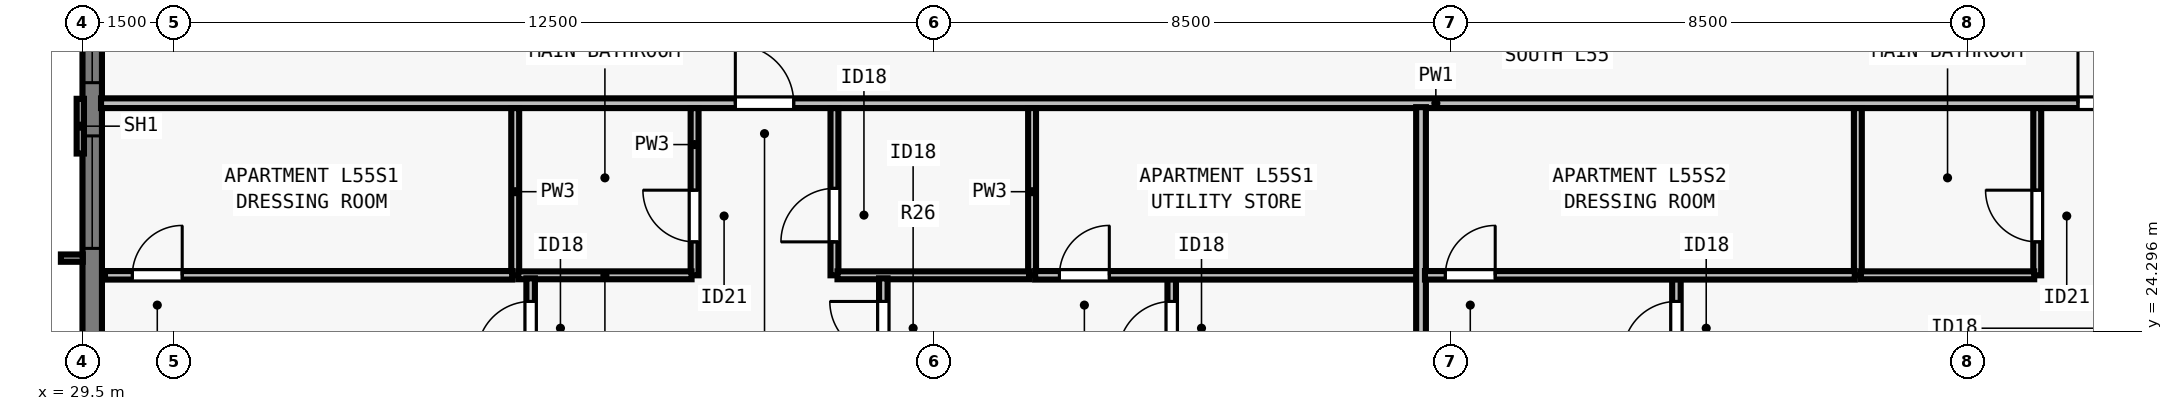
"""IFC4 building model, lengths in metres.
Left out: names, types, materials, properties, quantities, classifications, styles, units other than length and angle.
Written with IfcOpenShell. Run it as: python <this file> out.ifc"""

import sys

from ifc_helpers import new_model, si_unit, direction, frame, frame_2d, origin, place, context, subcontext, project, spatial, rectangle, extrude, element, fill, save


model = new_model("IFC4")
c1 = context("Model", 3, precision=1e-05, world=origin(), true_north=direction((0.0, 1.0)))
c2 = subcontext(c1, "Body", "Model", "MODEL_VIEW")
j1 = project(units=[si_unit("LENGTHUNIT", "METRE"), si_unit("PLANEANGLEUNIT", "RADIAN")], contexts=[c1])
p1 = place(None, origin())
s1 = spatial("IfcSite", under=j1, at=p1, CompositionType="ELEMENT")
p2 = place(p1, origin())
s2 = spatial("IfcBuilding", under=s1, at=p2, CompositionType="ELEMENT")
p3 = place(p2, frame((0.0, 0.0, 202.5)))
s3 = spatial("IfcBuildingStorey", under=s2, at=p3, CompositionType="ELEMENT", Elevation=202.5)
p4 = place(p3, frame((29.66, 21.5, 0.0), z_axis=(0.0, 0.0, 1.0), x_axis=(0.0, 1.0, 0.0)))
e1 = element("IfcWall", 1, at=p4, inside=s3, PredefinedType="SOLIDWALL", context=c2, shape_type="SweptSolid", body=[
    extrude(rectangle(XDim=34.702, YDim=0.32, at=frame_2d((17.351, 0.0))), origin(), (0.0, 0.0, 1.0), 3.29),
])
p5 = place(p4, frame((4.163, 0.0, 0.8)))
e2 = element("IfcOpeningElement", 2, at=p5, cuts=e1, PredefinedType="OPENING", context=c2, shape_type="SweptSolid", body=[
    extrude(rectangle(XDim=1.85, YDim=1.678, at=frame_2d((0.925, 0.839))), frame((0.0, 0.17, 0.0), z_axis=(0.0, -1.0, 0.0), x_axis=(1.0, 0.0, 0.0)), (0.0, 0.0, 1.0), 0.34),
])
p6 = place(p4, frame((6.888, 0.0, 0.8)))
e3 = element("IfcOpeningElement", 3, at=p6, cuts=e1, PredefinedType="OPENING", context=c2, shape_type="SweptSolid", body=[
    extrude(rectangle(XDim=1.55, YDim=1.678, at=frame_2d((0.775, 0.839))), frame((0.0, 0.17, 0.0), z_axis=(0.0, -1.0, 0.0), x_axis=(1.0, 0.0, 0.0)), (0.0, 0.0, 1.0), 0.34),
])
p7 = place(p4, frame((10.113, 0.0, 0.8)))
e4 = element("IfcOpeningElement", 4, at=p7, cuts=e1, PredefinedType="OPENING", context=c2, shape_type="SweptSolid", body=[
    extrude(rectangle(XDim=1.85, YDim=1.678, at=frame_2d((0.925, 0.839))), frame((0.0, 0.17, 0.0), z_axis=(0.0, -1.0, 0.0), x_axis=(1.0, 0.0, 0.0)), (0.0, 0.0, 1.0), 0.34),
])
p8 = place(p4, frame((14.888, 0.0, 0.8)))
e5 = element("IfcOpeningElement", 5, at=p8, cuts=e1, PredefinedType="OPENING", context=c2, shape_type="SweptSolid", body=[
    extrude(rectangle(XDim=1.55, YDim=1.678, at=frame_2d((0.775, 0.839))), frame((0.0, 0.17, 0.0), z_axis=(0.0, -1.0, 0.0), x_axis=(1.0, 0.0, 0.0)), (0.0, 0.0, 1.0), 0.34),
])
p9 = place(p4, frame((19.364, 0.0, 0.8)))
e6 = element("IfcOpeningElement", 6, at=p9, cuts=e1, PredefinedType="OPENING", context=c2, shape_type="SweptSolid", body=[
    extrude(rectangle(XDim=1.85, YDim=1.678, at=frame_2d((0.925, 0.839))), frame((0.0, 0.17, 0.0), z_axis=(0.0, -1.0, 0.0), x_axis=(1.0, 0.0, 0.0)), (0.0, 0.0, 1.0), 0.34),
])
p10 = place(p4, frame((23.614, 0.0, 0.8)))
e7 = element("IfcOpeningElement", 7, at=p10, cuts=e1, PredefinedType="OPENING", context=c2, shape_type="SweptSolid", body=[
    extrude(rectangle(XDim=1.85, YDim=1.678, at=frame_2d((0.925, 0.839))), frame((0.0, 0.17, 0.0), z_axis=(0.0, -1.0, 0.0), x_axis=(1.0, 0.0, 0.0)), (0.0, 0.0, 1.0), 0.34),
])
p11 = place(p4, frame((28.839, 0.0, 0.8)))
e8 = element("IfcOpeningElement", 8, at=p11, cuts=e1, PredefinedType="OPENING", context=c2, shape_type="SweptSolid", body=[
    extrude(rectangle(XDim=1.55, YDim=1.678, at=frame_2d((0.775, 0.839))), frame((0.0, 0.17, 0.0), z_axis=(0.0, -1.0, 0.0), x_axis=(1.0, 0.0, 0.0)), (0.0, 0.0, 1.0), 0.34),
])
p12 = place(p3, frame((29.805, 28.05, 0.0), z_axis=(0.0, 0.0, 1.0), x_axis=(1.0, 0.0, 0.0)))
e9 = element("IfcWall", 9, at=p12, inside=s3, PredefinedType="PARTITIONING", context=c2, shape_type="SweptSolid", body=[
    extrude(rectangle(XDim=44.39, YDim=0.16, at=frame_2d((22.195, 0.0))), origin(), (0.0, 0.0, 1.0), 2.958),
])
p13 = place(p12, frame((10.431, 0.0, 0.0)))
e10 = element("IfcOpeningElement", 10, at=p13, cuts=e9, PredefinedType="OPENING", context=c2, shape_type="SweptSolid", body=[
    extrude(rectangle(XDim=0.96, YDim=2.18, at=frame_2d((0.48, 1.09))), frame((0.0, 0.09, 0.0), z_axis=(0.0, -1.0, 0.0), x_axis=(1.0, 0.0, 0.0)), (0.0, 0.0, 1.0), 0.18),
])
p14 = place(p12, frame((32.511, 0.0, 0.0)))
e11 = element("IfcOpeningElement", 11, at=p14, cuts=e9, PredefinedType="OPENING", context=c2, shape_type="SweptSolid", body=[
    extrude(rectangle(XDim=0.96, YDim=2.18, at=frame_2d((0.48, 1.09))), frame((0.0, 0.09, 0.0), z_axis=(0.0, -1.0, 0.0), x_axis=(1.0, 0.0, 0.0)), (0.0, 0.0, 1.0), 0.18),
])
p15 = place(p3, frame((36.616, 25.22, 0.0), z_axis=(0.0, 0.0, 1.0), x_axis=(0.0, 1.0, 0.0)))
e12 = element("IfcWall", 12, at=p15, inside=s3, PredefinedType="PLUMBINGWALL", context=c2, shape_type="SweptSolid", body=[
    extrude(rectangle(XDim=2.75, YDim=0.13, at=frame_2d((1.375, 0.0))), origin(), (0.0, 0.0, 1.0), 3.29),
])
p16 = place(p3, frame((39.566, 25.22, 0.0), z_axis=(0.0, 0.0, 1.0), x_axis=(0.0, 1.0, 0.0)))
e13 = element("IfcWall", 13, at=p16, inside=s3, PredefinedType="PLUMBINGWALL", context=c2, shape_type="SweptSolid", body=[
    extrude(rectangle(XDim=2.75, YDim=0.13, at=frame_2d((1.375, 0.0))), origin(), (0.0, 0.0, 1.0), 3.29),
])
p17 = place(p16, frame((0.55, 0.0, 0.0)))
e14 = element("IfcOpeningElement", 14, at=p17, cuts=e13, PredefinedType="OPENING", context=c2, shape_type="SweptSolid", body=[
    extrude(rectangle(XDim=0.85, YDim=2.08, at=frame_2d((0.425, 1.04))), frame((0.0, 0.075, 0.0), z_axis=(0.0, -1.0, 0.0), x_axis=(1.0, 0.0, 0.0)), (0.0, 0.0, 1.0), 0.15),
])
p18 = place(p3, frame((36.666, 25.22, 0.0), z_axis=(0.0, 0.0, 1.0), x_axis=(1.0, 0.0, 0.0)))
e15 = element("IfcWall", 15, at=p18, inside=s3, PredefinedType="PLUMBINGWALL", context=c2, shape_type="SweptSolid", body=[
    extrude(rectangle(XDim=2.85, YDim=0.13, at=frame_2d((1.425, 0.0))), origin(), (0.0, 0.0, 1.0), 3.29),
])
p19 = place(p3, frame((45.116, 25.22, 0.0), z_axis=(0.0, 0.0, 1.0), x_axis=(0.0, 1.0, 0.0)))
e16 = element("IfcWall", 16, at=p19, inside=s3, PredefinedType="PLUMBINGWALL", context=c2, shape_type="SweptSolid", body=[
    extrude(rectangle(XDim=2.75, YDim=0.13, at=frame_2d((1.375, 0.0))), origin(), (0.0, 0.0, 1.0), 3.29),
])
p20 = place(p3, frame((41.866, 25.22, 0.0), z_axis=(0.0, 0.0, 1.0), x_axis=(0.0, 1.0, 0.0)))
e17 = element("IfcWall", 17, at=p20, inside=s3, PredefinedType="PLUMBINGWALL", context=c2, shape_type="SweptSolid", body=[
    extrude(rectangle(XDim=2.75, YDim=0.13, at=frame_2d((1.375, 0.0))), origin(), (0.0, 0.0, 1.0), 2.573),
])
p21 = place(p20, frame((0.55, 0.0, 0.0)))
e18 = element("IfcOpeningElement", 18, at=p21, cuts=e17, PredefinedType="OPENING", context=c2, shape_type="SweptSolid", body=[
    extrude(rectangle(XDim=0.88, YDim=2.1, at=frame_2d((0.44, 1.05))), frame((0.0, 0.075, 0.0), z_axis=(0.0, -1.0, 0.0), x_axis=(1.0, 0.0, 0.0)), (0.0, 0.0, 1.0), 0.15),
])
p22 = place(p3, frame((41.916, 25.22, 0.0), z_axis=(0.0, 0.0, 1.0), x_axis=(1.0, 0.0, 0.0)))
e19 = element("IfcWall", 19, at=p22, inside=s3, PredefinedType="PLUMBINGWALL", context=c2, shape_type="SweptSolid", body=[
    extrude(rectangle(XDim=3.15, YDim=0.13, at=frame_2d((1.575, 0.0))), origin(), (0.0, 0.0, 1.0), 3.29),
])
p23 = place(p3, frame((36.87, 16.88, 0.0), z_axis=(0.0, 0.0, 1.0), x_axis=(0.0, 1.0, 0.0)))
e20 = element("IfcWall", 20, at=p23, inside=s3, PredefinedType="PARTITIONING", context=c2, shape_type="SweptSolid", body=[
    extrude(rectangle(XDim=8.29, YDim=0.14, at=frame_2d((4.145, 0.0))), origin(), (0.0, 0.0, 1.0), 2.573),
])
p24 = place(p23, frame((7.03, 0.0, 0.0)))
e21 = element("IfcOpeningElement", 21, at=p24, cuts=e20, PredefinedType="OPENING", context=c2, shape_type="SweptSolid", body=[
    extrude(rectangle(XDim=0.88, YDim=2.1, at=frame_2d((0.44, 1.05))), frame((0.0, 0.08, 0.0), z_axis=(0.0, -1.0, 0.0), x_axis=(1.0, 0.0, 0.0)), (0.0, 0.0, 1.0), 0.16),
])
p25 = place(p3, frame((29.87, 25.22, 0.0), z_axis=(0.0, 0.0, 1.0), x_axis=(1.0, 0.0, 0.0)))
e22 = element("IfcWall", 22, at=p25, inside=s3, PredefinedType="PARTITIONING", context=c2, shape_type="SweptSolid", body=[
    extrude(rectangle(XDim=6.696, YDim=0.14, at=frame_2d((3.348, 0.0))), origin(), (0.0, 0.0, 1.0), 2.958),
])
p26 = place(p25, frame((0.45, 0.0, 0.0)))
e23 = element("IfcOpeningElement", 23, at=p26, cuts=e22, PredefinedType="OPENING", context=c2, shape_type="SweptSolid", body=[
    extrude(rectangle(XDim=0.82, YDim=2.1, at=frame_2d((0.41, 1.05))), frame((0.0, 0.08, 0.0), z_axis=(0.0, -1.0, 0.0), x_axis=(1.0, 0.0, 0.0)), (0.0, 0.0, 1.0), 0.16),
])
p27 = place(p3, frame((47.413, 16.88, 0.0), z_axis=(0.0, 0.0, 1.0), x_axis=(0.0, 1.0, 0.0)))
e24 = element("IfcWall", 24, at=p27, inside=s3, PredefinedType="PARTITIONING", context=c2, shape_type="SweptSolid", body=[
    extrude(rectangle(XDim=8.38, YDim=0.14, at=frame_2d((4.19, 0.0))), origin(), (0.0, 0.0, 1.0), 2.573),
])
p28 = place(p27, frame((7.03, 0.0, 0.0)))
e25 = element("IfcOpeningElement", 25, at=p28, cuts=e24, PredefinedType="OPENING", context=c2, shape_type="SweptSolid", body=[
    extrude(rectangle(XDim=0.88, YDim=2.1, at=frame_2d((0.44, 1.05))), frame((0.0, 0.08, 0.0), z_axis=(0.0, -1.0, 0.0), x_axis=(1.0, 0.0, 0.0)), (0.0, 0.0, 1.0), 0.16),
])
p29 = place(p3, frame((45.166, 25.22, 0.0), z_axis=(0.0, 0.0, 1.0), x_axis=(1.0, 0.0, 0.0)))
e26 = element("IfcWall", 26, at=p29, inside=s3, PredefinedType="PARTITIONING", context=c2, shape_type="SweptSolid", body=[
    extrude(rectangle(XDim=6.396, YDim=0.14, at=frame_2d((3.198, 0.0))), origin(), (0.0, 0.0, 1.0), 3.29),
])
p30 = place(p29, frame((0.4, 0.0, 0.0)))
e27 = element("IfcOpeningElement", 27, at=p30, cuts=e26, PredefinedType="OPENING", context=c2, shape_type="SweptSolid", body=[
    extrude(rectangle(XDim=0.82, YDim=2.1, at=frame_2d((0.41, 1.05))), frame((0.0, 0.08, 0.0), z_axis=(0.0, -1.0, 0.0), x_axis=(1.0, 0.0, 0.0)), (0.0, 0.0, 1.0), 0.16),
])
p31 = place(p3, frame((42.67, 16.88, 0.0), z_axis=(0.0, 0.0, 1.0), x_axis=(0.0, 1.0, 0.0)))
e28 = element("IfcWall", 28, at=p31, inside=s3, PredefinedType="PARTITIONING", context=c2, shape_type="SweptSolid", body=[
    extrude(rectangle(XDim=8.29, YDim=0.14, at=frame_2d((4.145, 0.0))), origin(), (0.0, 0.0, 1.0), 3.29),
])
p32 = place(p31, frame((7.03, 0.0, 0.0)))
e29 = element("IfcOpeningElement", 29, at=p32, cuts=e28, PredefinedType="OPENING", context=c2, shape_type="SweptSolid", body=[
    extrude(rectangle(XDim=0.88, YDim=2.1, at=frame_2d((0.44, 1.05))), frame((0.0, 0.08, 0.0), z_axis=(0.0, -1.0, 0.0), x_axis=(1.0, 0.0, 0.0)), (0.0, 0.0, 1.0), 0.16),
])
p33 = place(p3, frame((51.512, 16.805, 0.0), z_axis=(0.0, 0.0, 1.0), x_axis=(0.0, 1.0, 0.0)))
e30 = element("IfcWall", 30, at=p33, inside=s3, PredefinedType="PARTITIONING", context=c2, shape_type="SweptSolid", body=[
    extrude(rectangle(XDim=11.18, YDim=0.16, at=frame_2d((5.59, 0.0))), origin(), (0.0, 0.0, 1.0), 2.958),
])
p34 = place(p3, frame((58.696, 25.22, 0.0), z_axis=(0.0, 0.0, 1.0), x_axis=(0.0, 1.0, 0.0)))
e31 = element("IfcWall", 31, at=p34, inside=s3, PredefinedType="PLUMBINGWALL", context=c2, shape_type="SweptSolid", body=[
    extrude(rectangle(XDim=2.75, YDim=0.13, at=frame_2d((1.375, 0.0))), origin(), (0.0, 0.0, 1.0), 3.29),
])
p35 = place(p3, frame((61.646, 25.22, 0.0), z_axis=(0.0, 0.0, 1.0), x_axis=(0.0, 1.0, 0.0)))
e32 = element("IfcWall", 32, at=p35, inside=s3, PredefinedType="PLUMBINGWALL", context=c2, shape_type="SweptSolid", body=[
    extrude(rectangle(XDim=2.75, YDim=0.13, at=frame_2d((1.375, 0.0))), origin(), (0.0, 0.0, 1.0), 3.29),
])
p36 = place(p35, frame((0.55, 0.0, 0.0)))
e33 = element("IfcOpeningElement", 33, at=p36, cuts=e32, PredefinedType="OPENING", context=c2, shape_type="SweptSolid", body=[
    extrude(rectangle(XDim=0.85, YDim=2.08, at=frame_2d((0.425, 1.04))), frame((0.0, 0.075, 0.0), z_axis=(0.0, -1.0, 0.0), x_axis=(1.0, 0.0, 0.0)), (0.0, 0.0, 1.0), 0.15),
])
p37 = place(p3, frame((58.746, 25.22, 0.0), z_axis=(0.0, 0.0, 1.0), x_axis=(1.0, 0.0, 0.0)))
e34 = element("IfcWall", 34, at=p37, inside=s3, PredefinedType="PLUMBINGWALL", context=c2, shape_type="SweptSolid", body=[
    extrude(rectangle(XDim=2.85, YDim=0.13, at=frame_2d((1.425, 0.0))), origin(), (0.0, 0.0, 1.0), 3.29),
])
p38 = place(p3, frame((55.712, 16.88, 0.0), z_axis=(0.0, 0.0, 1.0), x_axis=(0.0, 1.0, 0.0)))
e35 = element("IfcWall", 35, at=p38, inside=s3, PredefinedType="PARTITIONING", context=c2, shape_type="SweptSolid", body=[
    extrude(rectangle(XDim=8.38, YDim=0.14, at=frame_2d((4.19, 0.0))), origin(), (0.0, 0.0, 1.0), 3.29),
])
p39 = place(p38, frame((7.03, 0.0, 0.0)))
e36 = element("IfcOpeningElement", 36, at=p39, cuts=e35, PredefinedType="OPENING", context=c2, shape_type="SweptSolid", body=[
    extrude(rectangle(XDim=0.88, YDim=2.1, at=frame_2d((0.44, 1.05))), frame((0.0, 0.08, 0.0), z_axis=(0.0, -1.0, 0.0), x_axis=(1.0, 0.0, 0.0)), (0.0, 0.0, 1.0), 0.16),
])
p40 = place(p3, frame((51.577, 25.22, 0.0), z_axis=(0.0, 0.0, 1.0), x_axis=(1.0, 0.0, 0.0)))
e37 = element("IfcWall", 37, at=p40, inside=s3, PredefinedType="PARTITIONING", context=c2, shape_type="SweptSolid", body=[
    extrude(rectangle(XDim=7.069, YDim=0.14, at=frame_2d((3.534, 0.0))), origin(), (0.0, 0.0, 1.0), 3.29),
])
p41 = place(p40, frame((0.335, 0.0, 0.0)))
e38 = element("IfcOpeningElement", 38, at=p41, cuts=e37, PredefinedType="OPENING", context=c2, shape_type="SweptSolid", body=[
    extrude(rectangle(XDim=0.82, YDim=2.1, at=frame_2d((0.41, 1.05))), frame((0.0, 0.08, 0.0), z_axis=(0.0, -1.0, 0.0), x_axis=(1.0, 0.0, 0.0)), (0.0, 0.0, 1.0), 0.16),
])
p42 = place(p5, origin())
e39 = element("IfcWindow", 39, at=p42, inside=s3, PartitioningType="SINGLE_PANEL", PredefinedType="WINDOW", context=c2, shape_type="SweptSolid", body=[
    extrude(rectangle(XDim=1.85, YDim=1.678, at=frame_2d((0.925, 0.839))), frame((0.0, -0.05, 0.0), z_axis=(0.0, -1.0, 0.0), x_axis=(1.0, 0.0, 0.0)), (0.0, 0.0, 1.0), 0.06),
])
fill(e2, e39)
p43 = place(p6, origin())
e40 = element("IfcWindow", 40, at=p43, inside=s3, PartitioningType="SINGLE_PANEL", PredefinedType="WINDOW", context=c2, shape_type="SweptSolid", body=[
    extrude(rectangle(XDim=1.55, YDim=1.678, at=frame_2d((0.775, 0.839))), frame((0.0, -0.05, 0.0), z_axis=(0.0, -1.0, 0.0), x_axis=(1.0, 0.0, 0.0)), (0.0, 0.0, 1.0), 0.06),
])
fill(e3, e40)
p44 = place(p17, origin())
e41 = element("IfcDoor", 41, at=p44, inside=s3, OperationType="SINGLE_SWING_RIGHT", PredefinedType="DOOR", context=c2, shape_type="SweptSolid", body=[
    extrude(rectangle(XDim=0.85, YDim=2.08, at=frame_2d((0.425, 1.04))), frame((0.0, 0.025, 0.0), z_axis=(0.0, -1.0, 0.0), x_axis=(1.0, 0.0, 0.0)), (0.0, 0.0, 1.0), 0.05),
])
fill(e14, e41)
p45 = place(p21, origin())
e42 = element("IfcDoor", 42, at=p45, inside=s3, OperationType="SINGLE_SWING_LEFT", PredefinedType="DOOR", context=c2, shape_type="SweptSolid", body=[
    extrude(rectangle(XDim=0.88, YDim=2.1, at=frame_2d((0.44, 1.05))), frame((0.0, 0.025, 0.0), z_axis=(0.0, -1.0, 0.0), x_axis=(1.0, 0.0, 0.0)), (0.0, 0.0, 1.0), 0.05),
])
fill(e18, e42)
p46 = place(p26, origin())
e43 = element("IfcDoor", 43, at=p46, inside=s3, OperationType="SINGLE_SWING_RIGHT", PredefinedType="DOOR", context=c2, shape_type="SweptSolid", body=[
    extrude(rectangle(XDim=0.82, YDim=2.1, at=frame_2d((0.41, 1.05))), frame((0.0, 0.025, 0.0), z_axis=(0.0, -1.0, 0.0), x_axis=(1.0, 0.0, 0.0)), (0.0, 0.0, 1.0), 0.05),
])
fill(e23, e43)
p47 = place(p24, origin())
e44 = element("IfcDoor", 44, at=p47, inside=s3, OperationType="SINGLE_SWING_LEFT", PredefinedType="DOOR", context=c2, shape_type="SweptSolid", body=[
    extrude(rectangle(XDim=0.88, YDim=2.1, at=frame_2d((0.44, 1.05))), frame((0.0, 0.025, 0.0), z_axis=(0.0, -1.0, 0.0), x_axis=(1.0, 0.0, 0.0)), (0.0, 0.0, 1.0), 0.05),
])
fill(e21, e44)
p48 = place(p30, origin())
e45 = element("IfcDoor", 45, at=p48, inside=s3, OperationType="SINGLE_SWING_RIGHT", PredefinedType="DOOR", context=c2, shape_type="SweptSolid", body=[
    extrude(rectangle(XDim=0.82, YDim=2.1, at=frame_2d((0.41, 1.05))), frame((0.0, 0.025, 0.0), z_axis=(0.0, -1.0, 0.0), x_axis=(1.0, 0.0, 0.0)), (0.0, 0.0, 1.0), 0.05),
])
fill(e27, e45)
p49 = place(p28, origin())
e46 = element("IfcDoor", 46, at=p49, inside=s3, OperationType="SINGLE_SWING_LEFT", PredefinedType="DOOR", context=c2, shape_type="SweptSolid", body=[
    extrude(rectangle(XDim=0.88, YDim=2.1, at=frame_2d((0.44, 1.05))), frame((0.0, 0.025, 0.0), z_axis=(0.0, -1.0, 0.0), x_axis=(1.0, 0.0, 0.0)), (0.0, 0.0, 1.0), 0.05),
])
fill(e25, e46)
p50 = place(p32, origin())
e47 = element("IfcDoor", 47, at=p50, inside=s3, OperationType="SINGLE_SWING_RIGHT", PredefinedType="DOOR", context=c2, shape_type="SweptSolid", body=[
    extrude(rectangle(XDim=0.88, YDim=2.1, at=frame_2d((0.44, 1.05))), frame((0.0, 0.025, 0.0), z_axis=(0.0, -1.0, 0.0), x_axis=(1.0, 0.0, 0.0)), (0.0, 0.0, 1.0), 0.05),
])
fill(e29, e47)
p51 = place(p13, origin())
e48 = element("IfcDoor", 48, at=p51, inside=s3, OperationType="SINGLE_SWING_LEFT", PredefinedType="DOOR", context=c2, shape_type="SweptSolid", body=[
    extrude(rectangle(XDim=0.96, YDim=2.18, at=frame_2d((0.48, 1.09))), frame((0.0, 0.025, 0.0), z_axis=(0.0, -1.0, 0.0), x_axis=(1.0, 0.0, 0.0)), (0.0, 0.0, 1.0), 0.05),
])
fill(e10, e48)
p52 = place(p36, origin())
e49 = element("IfcDoor", 49, at=p52, inside=s3, OperationType="SINGLE_SWING_RIGHT", PredefinedType="DOOR", context=c2, shape_type="SweptSolid", body=[
    extrude(rectangle(XDim=0.85, YDim=2.08, at=frame_2d((0.425, 1.04))), frame((0.0, 0.025, 0.0), z_axis=(0.0, -1.0, 0.0), x_axis=(1.0, 0.0, 0.0)), (0.0, 0.0, 1.0), 0.05),
])
fill(e33, e49)
p53 = place(p41, origin())
e50 = element("IfcDoor", 50, at=p53, inside=s3, OperationType="SINGLE_SWING_RIGHT", PredefinedType="DOOR", context=c2, shape_type="SweptSolid", body=[
    extrude(rectangle(XDim=0.82, YDim=2.1, at=frame_2d((0.41, 1.05))), frame((0.0, 0.025, 0.0), z_axis=(0.0, -1.0, 0.0), x_axis=(1.0, 0.0, 0.0)), (0.0, 0.0, 1.0), 0.05),
])
fill(e38, e50)
p54 = place(p39, origin())
e51 = element("IfcDoor", 51, at=p54, inside=s3, OperationType="SINGLE_SWING_LEFT", PredefinedType="DOOR", context=c2, shape_type="SweptSolid", body=[
    extrude(rectangle(XDim=0.88, YDim=2.1, at=frame_2d((0.44, 1.05))), frame((0.0, 0.025, 0.0), z_axis=(0.0, -1.0, 0.0), x_axis=(1.0, 0.0, 0.0)), (0.0, 0.0, 1.0), 0.05),
])
fill(e36, e51)
p55 = place(p14, origin())
e52 = element("IfcDoor", 52, at=p55, inside=s3, OperationType="SINGLE_SWING_LEFT", PredefinedType="DOOR", context=c2, shape_type="SweptSolid", body=[
    extrude(rectangle(XDim=0.96, YDim=2.18, at=frame_2d((0.48, 1.09))), frame((0.0, 0.025, 0.0), z_axis=(0.0, -1.0, 0.0), x_axis=(1.0, 0.0, 0.0)), (0.0, 0.0, 1.0), 0.05),
])
fill(e11, e52)
save(model, sys.argv[1])
